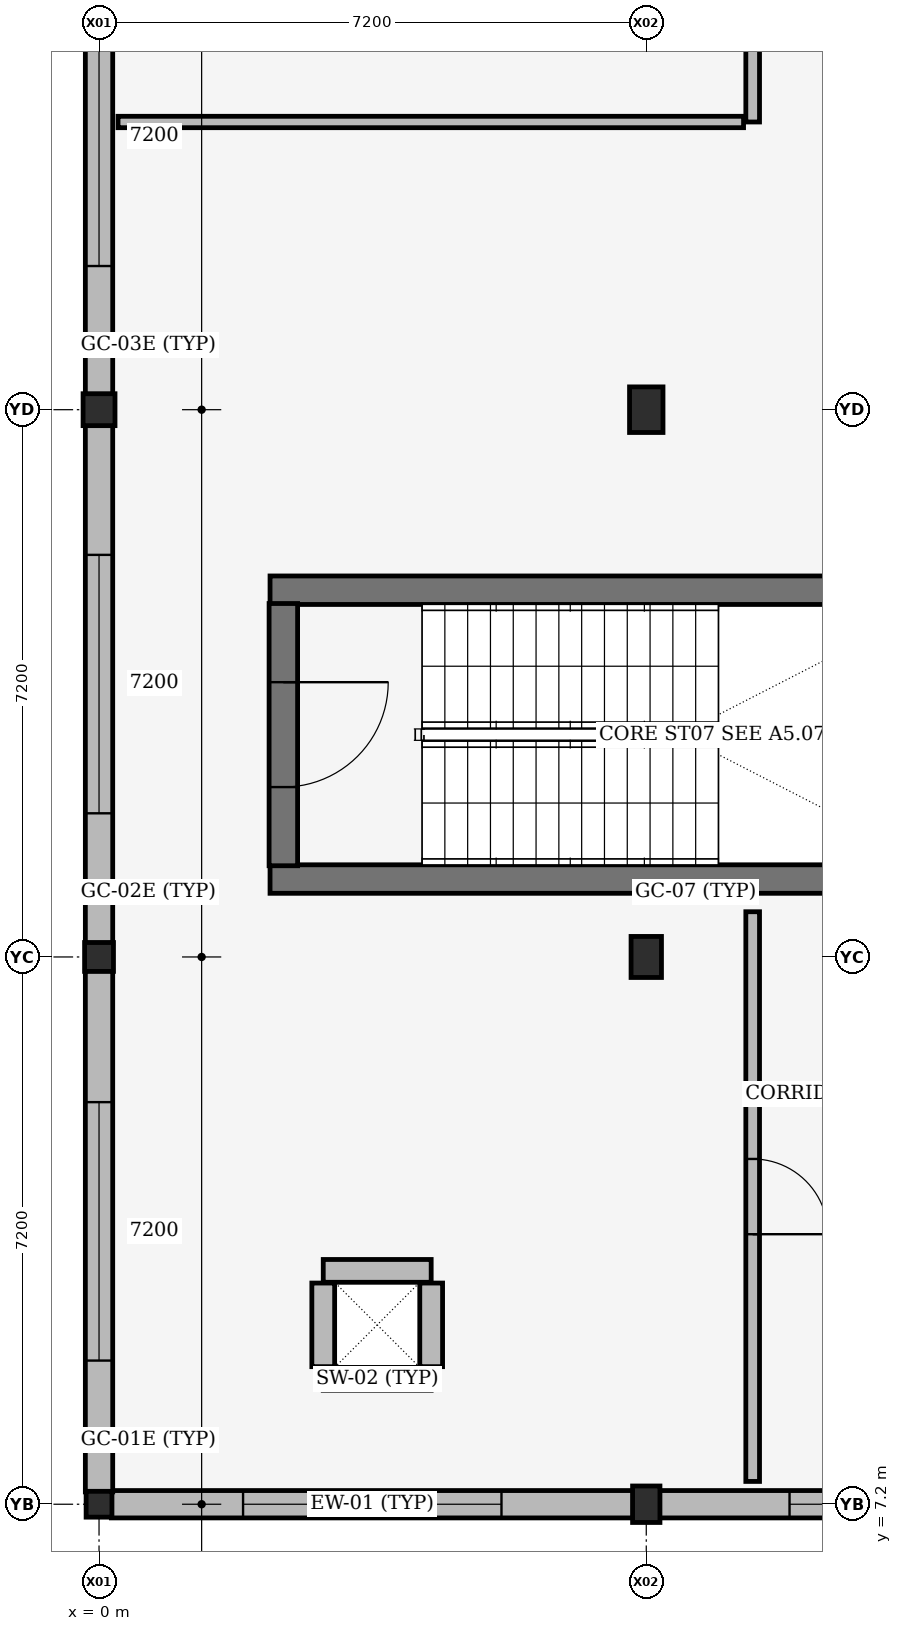
"""IFC4 building model, lengths in metres.
Left out: names, types, materials, properties, quantities, classifications, styles, units other than length and angle.
Written with IfcOpenShell. Run it as: python <this file> out.ifc"""

import sys

from ifc_helpers import new_model, si_unit, direction, frame, frame_2d, origin, origin_2d, place, context, subcontext, project, spatial, rectangle, extrude, element, fill, save


model = new_model("IFC4")
c1 = context("Model", 3, precision=1e-05, world=origin(), true_north=direction((0.0, 1.0)))
c2 = subcontext(c1, "Body", "Model", "MODEL_VIEW")
j1 = project(units=[si_unit("LENGTHUNIT", "METRE"), si_unit("PLANEANGLEUNIT", "RADIAN")], contexts=[c1])
p1 = place(None, origin())
s1 = spatial("IfcSite", under=j1, at=p1, CompositionType="ELEMENT")
p2 = place(p1, origin())
s2 = spatial("IfcBuilding", under=s1, at=p2, CompositionType="ELEMENT")
p3 = place(p2, frame((0.0, 0.0, 13.8)))
s3 = spatial("IfcBuildingStorey", under=s2, at=p3, CompositionType="ELEMENT", Elevation=13.8)
p4 = place(p3, frame((2.95, 8.85, 0.0), z_axis=(0.0, 0.0, 1.0), x_axis=(1.0, 0.0, 0.0)))
e1 = element("IfcWall", 1, at=p4, inside=s3, PredefinedType="SHEAR", context=c2, shape_type="SweptSolid", body=[
    extrude(rectangle(XDim=1.42, YDim=0.3, at=frame_2d((0.71, 0.0))), origin(), (0.0, 0.0, 1.0), 3.96),
])
p5 = place(p3, frame((4.37, 9.01, 0.0), z_axis=(0.0, 0.0, 1.0), x_axis=(0.0, 1.0, 0.0)))
e2 = element("IfcWall", 2, at=p5, inside=s3, PredefinedType="SHEAR", context=c2, shape_type="SweptSolid", body=[
    extrude(rectangle(XDim=1.1, YDim=0.3, at=frame_2d((0.55, 0.0))), origin(), (0.0, 0.0, 1.0), 3.96),
])
p6 = place(p3, frame((4.37, 10.27, 0.0), z_axis=(0.0, 0.0, 1.0), x_axis=(-1.0, 0.0, 0.0)))
e3 = element("IfcWall", 3, at=p6, inside=s3, PredefinedType="SHEAR", context=c2, shape_type="SweptSolid", body=[
    extrude(rectangle(XDim=1.42, YDim=0.3, at=frame_2d((0.71, 0.0))), origin(), (0.0, 0.0, 1.0), 3.96),
])
p7 = place(p3, frame((2.95, 10.11, 0.0), z_axis=(0.0, 0.0, 1.0), x_axis=(0.0, -1.0, 0.0)))
e4 = element("IfcWall", 4, at=p7, inside=s3, PredefinedType="SHEAR", context=c2, shape_type="SweptSolid", body=[
    extrude(rectangle(XDim=1.1, YDim=0.3, at=frame_2d((0.55, 0.0))), origin(), (0.0, 0.0, 1.0), 3.96),
])
p8 = place(p3, frame((0.0, 7.2, 0.0), z_axis=(0.0, 0.0, 1.0), x_axis=(1.0, 0.0, 0.0)))
e5 = element("IfcColumn", 5, at=p8, inside=s3, PredefinedType="COLUMN", context=c2, shape_type="SweptSolid", body=[
    extrude(rectangle(XDim=0.34, YDim=0.34, at=origin_2d()), origin(), (0.0, 0.0, 1.0), 3.92),
])
p9 = place(p3, frame((0.0, 14.4, 0.0), z_axis=(0.0, 0.0, 1.0), x_axis=(1.0, 0.0, 0.0)))
e6 = element("IfcColumn", 6, at=p9, inside=s3, PredefinedType="COLUMN", context=c2, shape_type="SweptSolid", body=[
    extrude(rectangle(XDim=0.38, YDim=0.38, at=origin_2d()), origin(), (0.0, 0.0, 1.0), 3.92),
])
p10 = place(p3, frame((0.0, 21.6, 0.0), z_axis=(0.0, 0.0, 1.0), x_axis=(1.0, 0.0, 0.0)))
e7 = element("IfcColumn", 7, at=p10, inside=s3, PredefinedType="COLUMN", context=c2, shape_type="SweptSolid", body=[
    extrude(rectangle(XDim=0.42, YDim=0.42, at=origin_2d()), origin(), (0.0, 0.0, 1.0), 3.92),
])
p11 = place(p3, frame((7.2, 7.2, 0.0), z_axis=(0.0, 0.0, 1.0), x_axis=(1.0, 0.0, 0.0)))
e8 = element("IfcColumn", 8, at=p11, inside=s3, PredefinedType="COLUMN", context=c2, shape_type="SweptSolid", body=[
    extrude(rectangle(XDim=0.36, YDim=0.48, at=origin_2d()), origin(), (0.0, 0.0, 1.0), 3.92),
])
p12 = place(p3, frame((7.2, 14.4, 0.0), z_axis=(0.0, 0.0, 1.0), x_axis=(1.0, 0.0, 0.0)))
e9 = element("IfcColumn", 9, at=p12, inside=s3, PredefinedType="COLUMN", context=c2, shape_type="SweptSolid", body=[
    extrude(rectangle(XDim=0.4, YDim=0.54, at=origin_2d()), origin(), (0.0, 0.0, 1.0), 3.92),
])
p13 = place(p3, frame((7.2, 21.6, 0.0), z_axis=(0.0, 0.0, 1.0), x_axis=(1.0, 0.0, 0.0)))
e10 = element("IfcColumn", 10, at=p13, inside=s3, PredefinedType="COLUMN", context=c2, shape_type="SweptSolid", body=[
    extrude(rectangle(XDim=0.44, YDim=0.6, at=origin_2d()), origin(), (0.0, 0.0, 1.0), 3.92),
])
for number, where, z_axis, x_axis in (
    (11, (2.25, 15.425, 0.0), (0.0, 0.0, 1.0), (1.0, 0.0, 0.0)),
    (12, (11.35, 19.225, 0.0), (0.0, 0.0, 1.0), (-1.0, 0.0, 0.0)),
):
    element("IfcWall", number, at=place(p3, frame(where, z_axis=z_axis, x_axis=x_axis)), inside=s3, PredefinedType="SHEAR", context=c2, shape_type="SweptSolid", body=[
        extrude(rectangle(XDim=9.1, YDim=0.375, at=frame_2d((4.55, 0.0))), origin(), (0.0, 0.0, 1.0), 3.92),
    ])
p14 = place(p3, frame((7.028, 7.2, 0.0), z_axis=(0.0, 0.0, 1.0), x_axis=(-1.0, 0.0, 0.0)))
e13 = element("IfcWall", 13, at=p14, inside=s3, PredefinedType="STANDARD", context=c2, shape_type="SweptSolid", body=[
    extrude(rectangle(XDim=6.866, YDim=0.36, at=frame_2d((3.433, 0.0))), origin(), (0.0, 0.0, 1.0), 3.18),
])
p15 = place(p14, frame((1.733, 0.0, 0.9)))
e14 = element("IfcOpeningElement", 14, at=p15, cuts=e13, PredefinedType="OPENING", context=c2, shape_type="SweptSolid", body=[
    extrude(rectangle(XDim=3.4, YDim=1.5, at=frame_2d((1.7, 0.75))), frame((0.0, 0.19, 0.0), z_axis=(0.0, -1.0, 0.0), x_axis=(1.0, 0.0, 0.0)), (0.0, 0.0, 1.0), 0.38),
])
p16 = place(p3, frame((14.198, 7.2, 0.0), z_axis=(0.0, 0.0, 1.0), x_axis=(-1.0, 0.0, 0.0)))
e15 = element("IfcWall", 15, at=p16, inside=s3, PredefinedType="STANDARD", context=c2, shape_type="SweptSolid", body=[
    extrude(rectangle(XDim=6.826, YDim=0.36, at=frame_2d((3.413, 0.0))), origin(), (0.0, 0.0, 1.0), 3.18),
])
p17 = place(p16, frame((1.713, 0.0, 0.9)))
e16 = element("IfcOpeningElement", 16, at=p17, cuts=e15, PredefinedType="OPENING", context=c2, shape_type="SweptSolid", body=[
    extrude(rectangle(XDim=3.4, YDim=1.5, at=frame_2d((1.7, 0.75))), frame((0.0, 0.19, 0.0), z_axis=(0.0, -1.0, 0.0), x_axis=(1.0, 0.0, 0.0)), (0.0, 0.0, 1.0), 0.38),
])
p18 = place(p3, frame((0.0, 7.362, 0.0), z_axis=(0.0, 0.0, 1.0), x_axis=(0.0, 1.0, 0.0)))
e17 = element("IfcWall", 17, at=p18, inside=s3, PredefinedType="STANDARD", context=c2, shape_type="SweptSolid", body=[
    extrude(rectangle(XDim=6.856, YDim=0.36, at=frame_2d((3.428, 0.0))), origin(), (0.0, 0.0, 1.0), 3.4),
])
p19 = place(p18, frame((1.728, 0.0, 0.9)))
e18 = element("IfcOpeningElement", 18, at=p19, cuts=e17, PredefinedType="OPENING", context=c2, shape_type="SweptSolid", body=[
    extrude(rectangle(XDim=3.4, YDim=1.5, at=frame_2d((1.7, 0.75))), frame((0.0, 0.19, 0.0), z_axis=(0.0, -1.0, 0.0), x_axis=(1.0, 0.0, 0.0)), (0.0, 0.0, 1.0), 0.38),
])
p20 = place(p3, frame((0.0, 14.582, 0.0), z_axis=(0.0, 0.0, 1.0), x_axis=(0.0, 1.0, 0.0)))
e19 = element("IfcWall", 19, at=p20, inside=s3, PredefinedType="STANDARD", context=c2, shape_type="SweptSolid", body=[
    extrude(rectangle(XDim=6.816, YDim=0.36, at=frame_2d((3.408, 0.0))), origin(), (0.0, 0.0, 1.0), 3.34),
])
p21 = place(p20, frame((1.708, 0.0, 0.9)))
e20 = element("IfcOpeningElement", 20, at=p21, cuts=e19, PredefinedType="OPENING", context=c2, shape_type="SweptSolid", body=[
    extrude(rectangle(XDim=3.4, YDim=1.5, at=frame_2d((1.7, 0.75))), frame((0.0, 0.19, 0.0), z_axis=(0.0, -1.0, 0.0), x_axis=(1.0, 0.0, 0.0)), (0.0, 0.0, 1.0), 0.38),
])
p22 = place(p3, frame((0.0, 21.802, 0.0), z_axis=(0.0, 0.0, 1.0), x_axis=(0.0, 1.0, 0.0)))
e21 = element("IfcWall", 21, at=p22, inside=s3, PredefinedType="STANDARD", context=c2, shape_type="SweptSolid", body=[
    extrude(rectangle(XDim=6.776, YDim=0.36, at=frame_2d((3.388, 0.0))), origin(), (0.0, 0.0, 1.0), 3.28),
])
p23 = place(p22, frame((1.688, 0.0, 0.9)))
e22 = element("IfcOpeningElement", 22, at=p23, cuts=e21, PredefinedType="OPENING", context=c2, shape_type="SweptSolid", body=[
    extrude(rectangle(XDim=3.4, YDim=1.5, at=frame_2d((1.7, 0.75))), frame((0.0, 0.19, 0.0), z_axis=(0.0, -1.0, 0.0), x_axis=(1.0, 0.0, 0.0)), (0.0, 0.0, 1.0), 0.38),
])
p24 = place(p3, frame((2.425, 19.05, 0.0), z_axis=(0.0, 0.0, 1.0), x_axis=(0.0, -1.0, 0.0)))
e23 = element("IfcWall", 23, at=p24, inside=s3, PredefinedType="SHEAR", context=c2, shape_type="SweptSolid", body=[
    extrude(rectangle(XDim=3.45, YDim=0.375, at=frame_2d((1.725, 0.0))), origin(), (0.0, 0.0, 1.0), 3.92),
])
p25 = place(p24, frame((1.035, 0.0, 0.0)))
e24 = element("IfcOpeningElement", 24, at=p25, cuts=e23, PredefinedType="OPENING", context=c2, shape_type="SweptSolid", body=[
    extrude(rectangle(XDim=1.38, YDim=2.2, at=frame_2d((0.69, 1.1))), frame((0.0, 0.198, 0.0), z_axis=(0.0, -1.0, 0.0), x_axis=(1.0, 0.0, 0.0)), (0.0, 0.0, 1.0), 0.395),
])
p26 = place(p3, frame((8.6, 7.5, 0.0), z_axis=(0.0, 0.0, 1.0), x_axis=(0.0, 1.0, 0.0)))
e25 = element("IfcWall", 25, at=p26, inside=s3, PredefinedType="PARTITIONING", context=c2, shape_type="SweptSolid", body=[
    extrude(rectangle(XDim=7.495, YDim=0.18, at=frame_2d((3.748, 0.0))), origin(), (0.0, 0.0, 1.0), 3.24),
])
p27 = place(p26, frame((3.252, 0.0, 0.0)))
e26 = element("IfcOpeningElement", 26, at=p27, cuts=e25, PredefinedType="OPENING", context=c2, shape_type="SweptSolid", body=[
    extrude(rectangle(XDim=0.99, YDim=2.18, at=frame_2d((0.495, 1.09))), frame((0.0, 0.1, 0.0), z_axis=(0.0, -1.0, 0.0), x_axis=(1.0, 0.0, 0.0)), (0.0, 0.0, 1.0), 0.2),
])
p28 = place(p3, frame((0.25, 25.385, 0.0), z_axis=(0.0, 0.0, 1.0), x_axis=(1.0, 0.0, 0.0)))
e27 = element("IfcWall", 27, at=p28, inside=s3, PredefinedType="PARTITIONING", context=c2, shape_type="SweptSolid", body=[
    extrude(rectangle(XDim=8.23, YDim=0.15, at=frame_2d((4.115, 0.0))), origin(), (0.0, 0.0, 1.0), 3.4),
])
p29 = place(p3, frame((8.6, 25.385, 0.0), z_axis=(0.0, 0.0, 1.0), x_axis=(0.0, 1.0, 0.0)))
e28 = element("IfcWall", 28, at=p29, inside=s3, PredefinedType="PARTITIONING", context=c2, shape_type="SweptSolid", body=[
    extrude(rectangle(XDim=6.21, YDim=0.18, at=frame_2d((3.105, 0.0))), origin(), (0.0, 0.0, 1.0), 3.4),
])
p30 = place(p29, frame((1.831, 0.0, 0.0)))
e29 = element("IfcOpeningElement", 29, at=p30, cuts=e28, PredefinedType="OPENING", context=c2, shape_type="SweptSolid", body=[
    extrude(rectangle(XDim=0.98, YDim=2.18, at=frame_2d((0.49, 1.09))), frame((0.0, 0.1, 0.0), z_axis=(0.0, -1.0, 0.0), x_axis=(1.0, 0.0, 0.0)), (0.0, 0.0, 1.0), 0.2),
])
p31 = place(p15, origin())
e30 = element("IfcWindow", 30, at=p31, inside=s3, PartitioningType="DOUBLE_PANEL_VERTICAL", PredefinedType="WINDOW", context=c2, shape_type="SweptSolid", body=[
    extrude(rectangle(XDim=3.4, YDim=1.5, at=frame_2d((1.7, 0.75))), frame((0.0, 0.03, 0.0), z_axis=(0.0, -1.0, 0.0), x_axis=(1.0, 0.0, 0.0)), (0.0, 0.0, 1.0), 0.06),
])
fill(e14, e30)
p32 = place(p17, origin())
e31 = element("IfcWindow", 31, at=p32, inside=s3, PartitioningType="DOUBLE_PANEL_VERTICAL", PredefinedType="WINDOW", context=c2, shape_type="SweptSolid", body=[
    extrude(rectangle(XDim=3.4, YDim=1.5, at=frame_2d((1.7, 0.75))), frame((0.0, 0.03, 0.0), z_axis=(0.0, -1.0, 0.0), x_axis=(1.0, 0.0, 0.0)), (0.0, 0.0, 1.0), 0.06),
])
fill(e16, e31)
p33 = place(p19, origin())
e32 = element("IfcWindow", 32, at=p33, inside=s3, PartitioningType="DOUBLE_PANEL_VERTICAL", PredefinedType="WINDOW", context=c2, shape_type="SweptSolid", body=[
    extrude(rectangle(XDim=3.4, YDim=1.5, at=frame_2d((1.7, 0.75))), frame((0.0, 0.03, 0.0), z_axis=(0.0, -1.0, 0.0), x_axis=(1.0, 0.0, 0.0)), (0.0, 0.0, 1.0), 0.06),
])
fill(e18, e32)
p34 = place(p21, origin())
e33 = element("IfcWindow", 33, at=p34, inside=s3, PartitioningType="DOUBLE_PANEL_VERTICAL", PredefinedType="WINDOW", context=c2, shape_type="SweptSolid", body=[
    extrude(rectangle(XDim=3.4, YDim=1.5, at=frame_2d((1.7, 0.75))), frame((0.0, 0.03, 0.0), z_axis=(0.0, -1.0, 0.0), x_axis=(1.0, 0.0, 0.0)), (0.0, 0.0, 1.0), 0.06),
])
fill(e20, e33)
p35 = place(p23, origin())
e34 = element("IfcWindow", 34, at=p35, inside=s3, PartitioningType="DOUBLE_PANEL_VERTICAL", PredefinedType="WINDOW", context=c2, shape_type="SweptSolid", body=[
    extrude(rectangle(XDim=3.4, YDim=1.5, at=frame_2d((1.7, 0.75))), frame((0.0, 0.03, 0.0), z_axis=(0.0, -1.0, 0.0), x_axis=(1.0, 0.0, 0.0)), (0.0, 0.0, 1.0), 0.06),
])
fill(e22, e34)
p36 = place(p25, origin())
e35 = element("IfcDoor", 35, at=p36, inside=s3, OperationType="DOUBLE_DOOR_SINGLE_SWING", PredefinedType="DOOR", context=c2, shape_type="SweptSolid", body=[
    extrude(rectangle(XDim=1.38, YDim=2.2, at=frame_2d((0.69, 1.1))), frame((0.0, 0.025, 0.0), z_axis=(0.0, -1.0, 0.0), x_axis=(1.0, 0.0, 0.0)), (0.0, 0.0, 1.0), 0.05),
])
fill(e24, e35)
p37 = place(p27, origin())
e36 = element("IfcDoor", 36, at=p37, inside=s3, OperationType="SINGLE_SWING_RIGHT", PredefinedType="DOOR", context=c2, shape_type="SweptSolid", body=[
    extrude(rectangle(XDim=0.99, YDim=2.18, at=frame_2d((0.495, 1.09))), frame((0.0, 0.025, 0.0), z_axis=(0.0, -1.0, 0.0), x_axis=(1.0, 0.0, 0.0)), (0.0, 0.0, 1.0), 0.05),
])
fill(e26, e36)
save(model, sys.argv[1])
